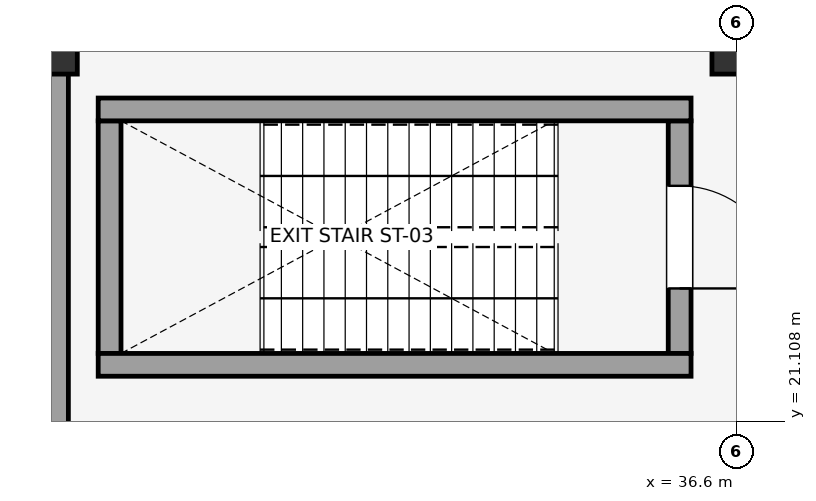
"""IFC4 building model, lengths in metres.
Left out: names, types, materials, properties, quantities, classifications, styles, units other than length and angle.
Written with IfcOpenShell. Run it as: python <this file> out.ifc"""

import sys

from ifc_helpers import new_model, si_unit, direction, frame, frame_2d, origin, origin_2d, place, context, subcontext, project, spatial, rectangle, extrude, element, fill, save


model = new_model("IFC4")
c1 = context("Model", 3, precision=1e-05, world=origin(), true_north=direction((0.0, 1.0)))
c2 = subcontext(c1, "Body", "Model", "MODEL_VIEW")
j1 = project(units=[si_unit("LENGTHUNIT", "METRE"), si_unit("PLANEANGLEUNIT", "RADIAN")], contexts=[c1])
p1 = place(None, origin())
s1 = spatial("IfcSite", under=j1, at=p1, CompositionType="ELEMENT")
p2 = place(p1, origin())
s2 = spatial("IfcBuilding", under=s1, at=p2, CompositionType="ELEMENT")
p3 = place(p2, frame((0.0, 0.0, 4.5)))
s3 = spatial("IfcBuildingStorey", under=s2, at=p3, CompositionType="ELEMENT", Elevation=4.5)
for number, where, z_axis, x_axis in (
    (1, (27.6, 26.0, 0.0), (0.0, 0.0, 1.0), (1.0, 0.0, 0.0)),
    (2, (36.6, 26.0, 0.0), (0.0, 0.0, 1.0), (1.0, 0.0, 0.0)),
):
    element("IfcColumn", number, at=place(p3, frame(where, z_axis=z_axis, x_axis=x_axis)), inside=s3, PredefinedType="COLUMN", context=c2, shape_type="SweptSolid", body=[
        extrude(rectangle(XDim=0.65, YDim=0.65, at=origin_2d()), origin(), (0.0, 0.0, 1.0), 4.5),
    ])
p4 = place(p3, frame((27.6, 26.325, 0.0), z_axis=(0.0, 0.0, 1.0), x_axis=(0.0, -1.0, 0.0)))
e3 = element("IfcWall", 3, at=p4, inside=s3, PredefinedType="SOLIDWALL", context=c2, shape_type="SweptSolid", body=[
    extrude(rectangle(XDim=8.109, YDim=0.415, at=frame_2d((4.054, 0.0))), origin(), (0.0, 0.0, 1.0), 3.12),
])
p5 = place(p3, frame((35.85, 25.06, 0.0), z_axis=(0.0, 0.0, 1.0), x_axis=(0.0, -1.0, 0.0)))
e4 = element("IfcWall", 4, at=p5, inside=s3, PredefinedType="SHEAR", context=c2, shape_type="SweptSolid", body=[
    extrude(rectangle(XDim=3.06, YDim=0.3, at=frame_2d((1.53, 0.0))), origin(), (0.0, 0.0, 1.0), 4.5),
])
p6 = place(p5, frame((0.855, 0.0, 0.0)))
e5 = element("IfcOpeningElement", 5, at=p6, cuts=e4, PredefinedType="OPENING", context=c2, shape_type="SweptSolid", body=[
    extrude(rectangle(XDim=1.35, YDim=2.15, at=frame_2d((0.675, 1.075))), frame((0.0, 0.16, 0.0), z_axis=(0.0, -1.0, 0.0), x_axis=(1.0, 0.0, 0.0)), (0.0, 0.0, 1.0), 0.32),
])
p7 = place(p3, frame((28.35, 25.06, 0.0), z_axis=(0.0, 0.0, 1.0), x_axis=(0.0, -1.0, 0.0)))
e6 = element("IfcWall", 6, at=p7, inside=s3, PredefinedType="SHEAR", context=c2, shape_type="SweptSolid", body=[
    extrude(rectangle(XDim=3.06, YDim=0.3, at=frame_2d((1.53, 0.0))), origin(), (0.0, 0.0, 1.0), 4.5),
])
for number, where, z_axis, x_axis in (
    (7, (36.0, 25.21, 0.0), (0.0, 0.0, 1.0), (-1.0, 0.0, 0.0)),
    (8, (36.0, 21.85, 0.0), (0.0, 0.0, 1.0), (-1.0, 0.0, 0.0)),
):
    element("IfcWall", number, at=place(p3, frame(where, z_axis=z_axis, x_axis=x_axis)), inside=s3, PredefinedType="SHEAR", context=c2, shape_type="SweptSolid", body=[
        extrude(rectangle(XDim=7.8, YDim=0.3, at=frame_2d((3.9, 0.0))), origin(), (0.0, 0.0, 1.0), 4.5),
    ])
p8 = place(p6, origin())
e9 = element("IfcDoor", 9, at=p8, inside=s3, OperationType="SINGLE_SWING_RIGHT", PredefinedType="DOOR", context=c2, shape_type="SweptSolid", body=[
    extrude(rectangle(XDim=1.35, YDim=2.15, at=frame_2d((0.675, 1.075))), frame((0.0, 0.025, 0.0), z_axis=(0.0, -1.0, 0.0), x_axis=(1.0, 0.0, 0.0)), (0.0, 0.0, 1.0), 0.05),
])
fill(e5, e9)
save(model, sys.argv[1])
